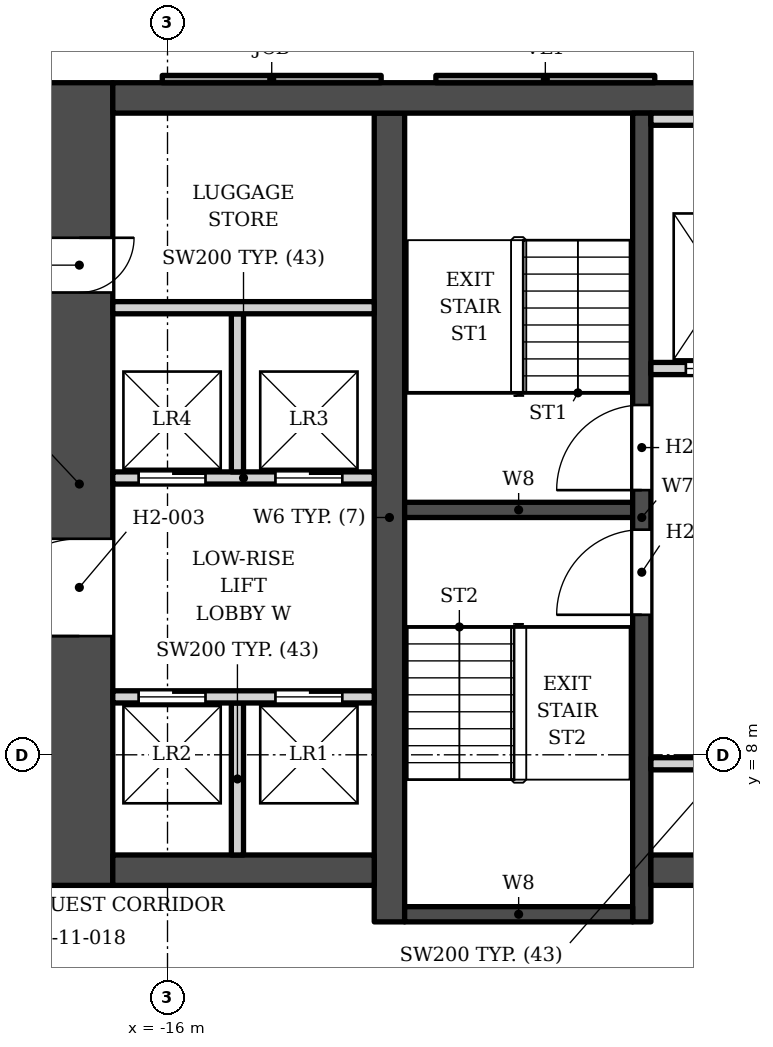
"""IFC4 building model, lengths in metres.
Left out: names, types, materials, properties, quantities, classifications, styles, units other than length and angle.
Written with IfcOpenShell. Run it as: python <this file> out.ifc"""

import sys

from ifc_helpers import new_model, si_unit, direction, frame, frame_2d, origin, place, context, subcontext, project, spatial, polyline, rectangle, outline, extrude, element, fill, save


model = new_model("IFC4")
c1 = context("Model", 3, precision=1e-05, world=origin(), true_north=direction((0.0, 1.0)))
c2 = subcontext(c1, "Body", "Model", "MODEL_VIEW")
j1 = project(units=[si_unit("LENGTHUNIT", "METRE"), si_unit("PLANEANGLEUNIT", "RADIAN")], contexts=[c1])
p1 = place(None, origin())
s1 = spatial("IfcSite", under=j1, at=p1, CompositionType="ELEMENT")
p2 = place(p1, origin())
s2 = spatial("IfcBuilding", under=s1, at=p2, CompositionType="ELEMENT")
p3 = place(p2, frame((0.0, 0.0, 56.2)))
s3 = spatial("IfcBuildingStorey", under=s2, at=p3, CompositionType="ELEMENT", Elevation=56.2)
p4 = place(p3, frame((-16.9, 18.802, 0.0), z_axis=(0.0, 0.0, 1.0), x_axis=(1.0, 0.0, 0.0)))
e1 = element("IfcWall", 1, at=p4, inside=s3, PredefinedType="SHEAR", context=c2, shape_type="SweptSolid", body=[
    extrude(rectangle(XDim=33.8, YDim=0.5, at=frame_2d((16.9, 0.0))), origin(), (0.0, 0.0, 1.0), 3.4),
])
p5 = place(p3, frame((-12.35, 5.253, 0.0), z_axis=(0.0, 0.0, 1.0), x_axis=(0.0, 1.0, 0.0)))
e2 = element("IfcWall", 2, at=p5, inside=s3, PredefinedType="SHEAR", context=c2, shape_type="SweptSolid", body=[
    extrude(rectangle(XDim=13.3, YDim=0.5, at=frame_2d((6.65, 0.0))), origin(), (0.0, 0.0, 1.0), 3.4),
])
p6 = place(p3, frame((-8.2, 5.253, 0.0), z_axis=(0.0, 0.0, 1.0), x_axis=(0.0, 1.0, 0.0)))
e3 = element("IfcWall", 3, at=p6, inside=s3, PredefinedType="SHEAR", context=c2, shape_type="SweptSolid", body=[
    extrude(rectangle(XDim=13.3, YDim=0.3, at=frame_2d((6.65, 0.0))), origin(), (0.0, 0.0, 1.0), 3.4),
])
p7 = place(p6, frame((7.1, 0.0, 0.0)))
e4 = element("IfcOpeningElement", 4, at=p7, cuts=e3, PredefinedType="OPENING", context=c2, shape_type="SweptSolid", body=[
    extrude(rectangle(XDim=1.4, YDim=2.1, at=frame_2d((0.7, 1.05))), frame((0.0, 0.16, 0.0), z_axis=(0.0, -1.0, 0.0), x_axis=(1.0, 0.0, 0.0)), (0.0, 0.0, 1.0), 0.32),
])
p8 = place(p6, frame((5.05, 0.0, 0.0)))
e5 = element("IfcOpeningElement", 5, at=p8, cuts=e3, PredefinedType="OPENING", context=c2, shape_type="SweptSolid", body=[
    extrude(rectangle(XDim=1.4, YDim=2.1, at=frame_2d((0.7, 1.05))), frame((0.0, 0.16, 0.0), z_axis=(0.0, -1.0, 0.0), x_axis=(1.0, 0.0, 0.0)), (0.0, 0.0, 1.0), 0.32),
])
for number, where, z_axis, x_axis in (
    (6, (-12.1, 12.028, 0.0), (0.0, 0.0, 1.0), (1.0, 0.0, 0.0)),
    (7, (-12.1, 5.378, 0.0), (0.0, 0.0, 1.0), (1.0, 0.0, 0.0)),
):
    element("IfcWall", number, at=place(p3, frame(where, z_axis=z_axis, x_axis=x_axis)), inside=s3, PredefinedType="SHEAR", context=c2, shape_type="SweptSolid", body=[
        extrude(rectangle(XDim=3.75, YDim=0.25, at=frame_2d((1.875, 0.0))), origin(), (0.0, 0.0, 1.0), 3.4),
    ])
p9 = place(p3, frame((-8.05, 6.103, 0.0), z_axis=(0.0, 0.0, 1.0), x_axis=(1.0, 0.0, 0.0)))
e8 = element("IfcWall", 8, at=p9, inside=s3, PredefinedType="SHEAR", context=c2, shape_type="SweptSolid", body=[
    extrude(rectangle(XDim=7.05, YDim=0.5, at=frame_2d((3.525, 0.0))), origin(), (0.0, 0.0, 1.0), 3.4),
])
p10 = place(p9, frame((0.825, 0.0, 0.0)))
e9 = element("IfcOpeningElement", 9, at=p10, cuts=e8, PredefinedType="OPENING", context=c2, shape_type="SweptSolid", body=[
    extrude(rectangle(XDim=0.9, YDim=2.1, at=frame_2d((0.45, 1.05))), frame((0.0, 0.26, 0.0), z_axis=(0.0, -1.0, 0.0), x_axis=(1.0, 0.0, 0.0)), (0.0, 0.0, 1.0), 0.52),
])
p11 = place(p3, frame((-12.6, 6.103, 0.0), z_axis=(0.0, 0.0, 1.0), x_axis=(-1.0, 0.0, 0.0)))
e10 = element("IfcWall", 10, at=p11, inside=s3, PredefinedType="SHEAR", context=c2, shape_type="SweptSolid", body=[
    extrude(rectangle(XDim=4.3, YDim=0.5, at=frame_2d((2.15, 0.0))), origin(), (0.0, 0.0, 1.0), 3.4),
])
p12 = place(p3, frame((-17.45, 5.853, 0.0), z_axis=(0.0, 0.0, 1.0), x_axis=(0.0, 1.0, 0.0)))
e11 = element("IfcWall", 11, at=p12, inside=s3, PredefinedType="SHEAR", context=c2, shape_type="SweptSolid", body=[
    extrude(rectangle(XDim=13.2, YDim=1.1, at=frame_2d((6.6, 0.0))), origin(), (0.0, 0.0, 1.0), 3.4),
])
p13 = place(p12, frame((4.1, 0.0, 0.0)))
e12 = element("IfcOpeningElement", 12, at=p13, cuts=e11, PredefinedType="OPENING", context=c2, shape_type="SweptSolid", body=[
    extrude(rectangle(XDim=1.6, YDim=2.1, at=frame_2d((0.8, 1.05))), frame((0.0, 0.56, 0.0), z_axis=(0.0, -1.0, 0.0), x_axis=(1.0, 0.0, 0.0)), (0.0, 0.0, 1.0), 1.12),
])
p14 = place(p12, frame((9.75, 0.0, 0.0)))
e13 = element("IfcOpeningElement", 13, at=p14, cuts=e11, PredefinedType="OPENING", context=c2, shape_type="SweptSolid", body=[
    extrude(rectangle(XDim=0.9, YDim=2.1, at=frame_2d((0.45, 1.05))), frame((0.0, 0.56, 0.0), z_axis=(0.0, -1.0, 0.0), x_axis=(1.0, 0.0, 0.0)), (0.0, 0.0, 1.0), 1.12),
])
p15 = place(p3, origin())
e14 = element("IfcWall", 14, at=p15, inside=s3, PredefinedType="ELEMENTEDWALL", context=c2, shape_type="SweptSolid", body=[
    extrude(outline(polyline([(-11.586, 19.173), (-11.586, 19.052), (-7.986, 19.052), (-7.986, 19.173), (-11.586, 19.173)])), origin(), (0.0, 0.0, 1.0), 2.65),
])
p16 = place(p3, origin())
e15 = element("IfcWall", 15, at=p16, inside=s3, PredefinedType="SOLIDWALL", context=c2, shape_type="SweptSolid", body=[
    extrude(outline(polyline([(-16.086, 19.173), (-16.086, 19.052), (-12.486, 19.052), (-12.486, 19.173), (-16.086, 19.173)])), origin(), (0.0, 0.0, 1.0), 2.65),
])
for number, where, z_axis, x_axis in (
    (16, (-14.85, 6.353, 0.0), (0.0, 0.0, 1.0), (0.0, 1.0, 0.0)),
    (17, (-8.05, 7.853, 0.0), (0.0, 0.0, 1.0), (1.0, 0.0, 0.0)),
):
    element("IfcWall", number, at=place(p3, frame(where, z_axis=z_axis, x_axis=x_axis)), inside=s3, PredefinedType="SOLIDWALL", context=c2, shape_type="SweptSolid", body=[
        extrude(rectangle(XDim=2.5, YDim=0.2, at=frame_2d((1.25, 0.0))), origin(), (0.0, 0.0, 1.0), 3.23),
    ])
p17 = place(p3, frame((-16.9, 8.953, 0.0), z_axis=(0.0, 0.0, 1.0), x_axis=(1.0, 0.0, 0.0)))
e18 = element("IfcWall", 18, at=p17, inside=s3, PredefinedType="SOLIDWALL", context=c2, shape_type="SweptSolid", body=[
    extrude(rectangle(XDim=4.3, YDim=0.2, at=frame_2d((2.15, 0.0))), origin(), (0.0, 0.0, 1.0), 3.23),
])
p18 = place(p17, frame((2.675, 0.0, 0.0)))
e19 = element("IfcOpeningElement", 19, at=p18, cuts=e18, PredefinedType="OPENING", context=c2, shape_type="SweptSolid", body=[
    extrude(rectangle(XDim=1.1, YDim=2.1, at=frame_2d((0.55, 1.05))), frame((0.0, 0.11, 0.0), z_axis=(0.0, -1.0, 0.0), x_axis=(1.0, 0.0, 0.0)), (0.0, 0.0, 1.0), 0.22),
])
p19 = place(p17, frame((0.425, 0.0, 0.0)))
e20 = element("IfcOpeningElement", 20, at=p19, cuts=e18, PredefinedType="OPENING", context=c2, shape_type="SweptSolid", body=[
    extrude(rectangle(XDim=1.1, YDim=2.1, at=frame_2d((0.55, 1.05))), frame((0.0, 0.11, 0.0), z_axis=(0.0, -1.0, 0.0), x_axis=(1.0, 0.0, 0.0)), (0.0, 0.0, 1.0), 0.22),
])
p20 = place(p3, frame((-16.9, 12.552, 0.0), z_axis=(0.0, 0.0, 1.0), x_axis=(1.0, 0.0, 0.0)))
e21 = element("IfcWall", 21, at=p20, inside=s3, PredefinedType="SOLIDWALL", context=c2, shape_type="SweptSolid", body=[
    extrude(rectangle(XDim=4.3, YDim=0.2, at=frame_2d((2.15, 0.0))), origin(), (0.0, 0.0, 1.0), 3.23),
])
p21 = place(p20, frame((2.675, 0.0, 0.0)))
e22 = element("IfcOpeningElement", 22, at=p21, cuts=e21, PredefinedType="OPENING", context=c2, shape_type="SweptSolid", body=[
    extrude(rectangle(XDim=1.1, YDim=2.1, at=frame_2d((0.55, 1.05))), frame((0.0, 0.11, 0.0), z_axis=(0.0, -1.0, 0.0), x_axis=(1.0, 0.0, 0.0)), (0.0, 0.0, 1.0), 0.22),
])
p22 = place(p20, frame((0.425, 0.0, 0.0)))
e23 = element("IfcOpeningElement", 23, at=p22, cuts=e21, PredefinedType="OPENING", context=c2, shape_type="SweptSolid", body=[
    extrude(rectangle(XDim=1.1, YDim=2.1, at=frame_2d((0.55, 1.05))), frame((0.0, 0.11, 0.0), z_axis=(0.0, -1.0, 0.0), x_axis=(1.0, 0.0, 0.0)), (0.0, 0.0, 1.0), 0.22),
])
p23 = place(p3, frame((-14.85, 12.653, 0.0), z_axis=(0.0, 0.0, 1.0), x_axis=(0.0, 1.0, 0.0)))
e24 = element("IfcWall", 24, at=p23, inside=s3, PredefinedType="SOLIDWALL", context=c2, shape_type="SweptSolid", body=[
    extrude(rectangle(XDim=2.6, YDim=0.2, at=frame_2d((1.3, 0.0))), origin(), (0.0, 0.0, 1.0), 3.23),
])
p24 = place(p3, frame((-8.05, 14.353, 0.0), z_axis=(0.0, 0.0, 1.0), x_axis=(1.0, 0.0, 0.0)))
e25 = element("IfcWall", 25, at=p24, inside=s3, PredefinedType="SOLIDWALL", context=c2, shape_type="SweptSolid", body=[
    extrude(rectangle(XDim=2.35, YDim=0.2, at=frame_2d((1.175, 0.0))), origin(), (0.0, 0.0, 1.0), 3.23),
])
p25 = place(p24, frame((0.575, 0.0, 0.0)))
e26 = element("IfcOpeningElement", 26, at=p25, cuts=e25, PredefinedType="OPENING", context=c2, shape_type="SweptSolid", body=[
    extrude(rectangle(XDim=1.2, YDim=2.1, at=frame_2d((0.6, 1.05))), frame((0.0, 0.11, 0.0), z_axis=(0.0, -1.0, 0.0), x_axis=(1.0, 0.0, 0.0)), (0.0, 0.0, 1.0), 0.22),
])
p26 = place(p3, frame((-16.9, 15.353, 0.0), z_axis=(0.0, 0.0, 1.0), x_axis=(1.0, 0.0, 0.0)))
e27 = element("IfcWall", 27, at=p26, inside=s3, PredefinedType="SOLIDWALL", context=c2, shape_type="SweptSolid", body=[
    extrude(rectangle(XDim=4.3, YDim=0.2, at=frame_2d((2.15, 0.0))), origin(), (0.0, 0.0, 1.0), 3.23),
])
p27 = place(p3, frame((-8.05, 18.453, 0.0), z_axis=(0.0, 0.0, 1.0), x_axis=(1.0, 0.0, 0.0)))
e28 = element("IfcWall", 28, at=p27, inside=s3, PredefinedType="SOLIDWALL", context=c2, shape_type="SweptSolid", body=[
    extrude(rectangle(XDim=2.35, YDim=0.2, at=frame_2d((1.175, 0.0))), origin(), (0.0, 0.0, 1.0), 3.23),
])
p28 = place(p25, origin())
e29 = element("IfcDoor", 29, at=p28, inside=s3, OperationType="DOUBLE_DOOR_SLIDING", PredefinedType="DOOR", context=c2, shape_type="SweptSolid", body=[
    extrude(rectangle(XDim=1.2, YDim=2.1, at=frame_2d((0.6, 1.05))), frame((0.0, 0.025, 0.0), z_axis=(0.0, -1.0, 0.0), x_axis=(1.0, 0.0, 0.0)), (0.0, 0.0, 1.0), 0.05),
])
fill(e26, e29)
p29 = place(p18, origin())
e30 = element("IfcDoor", 30, at=p29, inside=s3, OperationType="DOUBLE_DOOR_SLIDING", PredefinedType="DOOR", context=c2, shape_type="SweptSolid", body=[
    extrude(rectangle(XDim=1.1, YDim=2.1, at=frame_2d((0.55, 1.05))), frame((0.0, 0.025, 0.0), z_axis=(0.0, -1.0, 0.0), x_axis=(1.0, 0.0, 0.0)), (0.0, 0.0, 1.0), 0.05),
])
fill(e19, e30)
p30 = place(p21, origin())
e31 = element("IfcDoor", 31, at=p30, inside=s3, OperationType="DOUBLE_DOOR_SLIDING", PredefinedType="DOOR", context=c2, shape_type="SweptSolid", body=[
    extrude(rectangle(XDim=1.1, YDim=2.1, at=frame_2d((0.55, 1.05))), frame((0.0, 0.025, 0.0), z_axis=(0.0, -1.0, 0.0), x_axis=(1.0, 0.0, 0.0)), (0.0, 0.0, 1.0), 0.05),
])
fill(e22, e31)
p31 = place(p19, origin())
e32 = element("IfcDoor", 32, at=p31, inside=s3, OperationType="DOUBLE_DOOR_SLIDING", PredefinedType="DOOR", context=c2, shape_type="SweptSolid", body=[
    extrude(rectangle(XDim=1.1, YDim=2.1, at=frame_2d((0.55, 1.05))), frame((0.0, 0.025, 0.0), z_axis=(0.0, -1.0, 0.0), x_axis=(1.0, 0.0, 0.0)), (0.0, 0.0, 1.0), 0.05),
])
fill(e20, e32)
p32 = place(p22, origin())
e33 = element("IfcDoor", 33, at=p32, inside=s3, OperationType="DOUBLE_DOOR_SLIDING", PredefinedType="DOOR", context=c2, shape_type="SweptSolid", body=[
    extrude(rectangle(XDim=1.1, YDim=2.1, at=frame_2d((0.55, 1.05))), frame((0.0, 0.025, 0.0), z_axis=(0.0, -1.0, 0.0), x_axis=(1.0, 0.0, 0.0)), (0.0, 0.0, 1.0), 0.05),
])
fill(e23, e33)
p33 = place(p7, origin())
e34 = element("IfcDoor", 34, at=p33, inside=s3, OperationType="SINGLE_SWING_LEFT", PredefinedType="DOOR", context=c2, shape_type="SweptSolid", body=[
    extrude(rectangle(XDim=1.4, YDim=2.1, at=frame_2d((0.7, 1.05))), frame((0.0, 0.025, 0.0), z_axis=(0.0, -1.0, 0.0), x_axis=(1.0, 0.0, 0.0)), (0.0, 0.0, 1.0), 0.05),
])
fill(e4, e34)
p34 = place(p8, origin())
e35 = element("IfcDoor", 35, at=p34, inside=s3, OperationType="SINGLE_SWING_LEFT", PredefinedType="DOOR", context=c2, shape_type="SweptSolid", body=[
    extrude(rectangle(XDim=1.4, YDim=2.1, at=frame_2d((0.7, 1.05))), frame((0.0, 0.025, 0.0), z_axis=(0.0, -1.0, 0.0), x_axis=(1.0, 0.0, 0.0)), (0.0, 0.0, 1.0), 0.05),
])
fill(e5, e35)
p35 = place(p13, origin())
e36 = element("IfcDoor", 36, at=p35, inside=s3, OperationType="DOUBLE_DOOR_SINGLE_SWING", PredefinedType="DOOR", context=c2, shape_type="SweptSolid", body=[
    extrude(rectangle(XDim=1.6, YDim=2.1, at=frame_2d((0.8, 1.05))), frame((0.0, -0.225, 0.0), z_axis=(0.0, -1.0, 0.0), x_axis=(1.0, 0.0, 0.0)), (0.0, 0.0, 1.0), 0.05),
])
fill(e12, e36)
p36 = place(p14, origin())
e37 = element("IfcDoor", 37, at=p36, inside=s3, OperationType="SINGLE_SWING_RIGHT", PredefinedType="DOOR", context=c2, shape_type="SweptSolid", body=[
    extrude(rectangle(XDim=0.9, YDim=2.1, at=frame_2d((0.45, 1.05))), frame((0.0, -0.225, 0.0), z_axis=(0.0, -1.0, 0.0), x_axis=(1.0, 0.0, 0.0)), (0.0, 0.0, 1.0), 0.05),
])
fill(e13, e37)
save(model, sys.argv[1])
